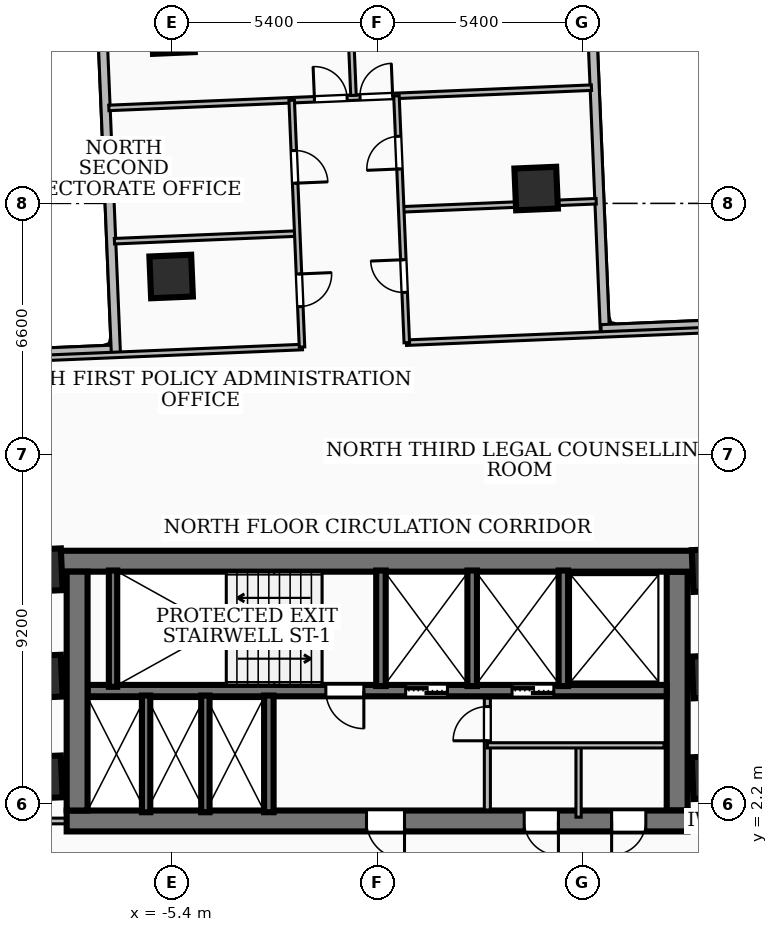
"""IFC4 building model, lengths in metres.
Left out: names, types, materials, properties, quantities, classifications, styles, units other than length and angle.
Written with IfcOpenShell. Run it as: python <this file> out.ifc"""

import sys

from ifc_helpers import new_model, si_unit, direction, frame, frame_2d, origin, origin_2d, place, context, subcontext, project, spatial, rectangle, extrude, element, fill, save


model = new_model("IFC4")
c1 = context("Model", 3, precision=1e-05, world=origin(), true_north=direction((0.0, 1.0)))
c2 = subcontext(c1, "Body", "Model", "MODEL_VIEW")
j1 = project(units=[si_unit("LENGTHUNIT", "METRE"), si_unit("PLANEANGLEUNIT", "RADIAN")], contexts=[c1])
p1 = place(None, origin())
s1 = spatial("IfcSite", under=j1, at=p1, CompositionType="ELEMENT")
p2 = place(p1, origin())
s2 = spatial("IfcBuilding", under=s1, at=p2, CompositionType="ELEMENT")
p3 = place(p2, frame((0.0, 0.0, 42.48)))
s3 = spatial("IfcBuildingStorey", under=s2, at=p3, CompositionType="ELEMENT", Elevation=42.48)
p4 = place(p3, frame((-8.78, 8.585, 0.0), z_axis=(0.0, 0.0, 1.0), x_axis=(1.0, 0.0, 0.0)))
e1 = element("IfcWall", 1, at=p4, inside=s3, PredefinedType="SHEAR", context=c2, shape_type="SweptSolid", body=[
    extrude(rectangle(XDim=17.56, YDim=0.55, at=frame_2d((8.78, 0.0))), origin(), (0.0, 0.0, 1.0), 3.34),
])
p5 = place(p3, frame((8.17, 1.75, 0.0), z_axis=(0.0, 0.0, 1.0), x_axis=(-1.0, 0.0, 0.0)))
e2 = element("IfcWall", 2, at=p5, inside=s3, PredefinedType="SHEAR", context=c2, shape_type="SweptSolid", body=[
    extrude(rectangle(XDim=16.34, YDim=0.55, at=frame_2d((8.17, 0.0))), origin(), (0.0, 0.0, 1.0), 3.34),
])
p6 = place(p5, frame((7.45, 0.0, 0.0)))
e3 = element("IfcOpeningElement", 3, at=p6, cuts=e2, PredefinedType="OPENING", context=c2, shape_type="SweptSolid", body=[
    extrude(rectangle(XDim=1.0, YDim=2.1, at=frame_2d((0.5, 1.05))), frame((0.0, 0.285, 0.0), z_axis=(0.0, -1.0, 0.0), x_axis=(1.0, 0.0, 0.0)), (0.0, 0.0, 1.0), 0.57),
])
p7 = place(p5, frame((3.4, 0.0, 0.0)))
e4 = element("IfcOpeningElement", 4, at=p7, cuts=e2, PredefinedType="OPENING", context=c2, shape_type="SweptSolid", body=[
    extrude(rectangle(XDim=0.9, YDim=2.06, at=frame_2d((0.45, 1.03))), frame((0.0, 0.285, 0.0), z_axis=(0.0, -1.0, 0.0), x_axis=(1.0, 0.0, 0.0)), (0.0, 0.0, 1.0), 0.57),
])
p8 = place(p5, frame((1.1, 0.0, 0.0)))
e5 = element("IfcOpeningElement", 5, at=p8, cuts=e2, PredefinedType="OPENING", context=c2, shape_type="SweptSolid", body=[
    extrude(rectangle(XDim=0.9, YDim=2.06, at=frame_2d((0.45, 1.03))), frame((0.0, 0.285, 0.0), z_axis=(0.0, -1.0, 0.0), x_axis=(1.0, 0.0, 0.0)), (0.0, 0.0, 1.0), 0.57),
])
for number, where, z_axis, x_axis in (
    (6, (-7.895, 2.025, 0.0), (0.0, 0.0, 1.0), (0.0, 1.0, 0.0)),
    (7, (7.895, 8.31, 0.0), (0.0, 0.0, 1.0), (0.0, -1.0, 0.0)),
):
    element("IfcWall", number, at=place(p3, frame(where, z_axis=z_axis, x_axis=x_axis)), inside=s3, PredefinedType="SHEAR", context=c2, shape_type="SweptSolid", body=[
        extrude(rectangle(XDim=6.285, YDim=0.55, at=frame_2d((3.143, 0.0))), origin(), (0.0, 0.0, 1.0), 3.34),
    ])
p9 = place(p3, frame((7.62, 5.18, 0.0), z_axis=(0.0, 0.0, 1.0), x_axis=(-1.0, 0.0, 0.0)))
e8 = element("IfcWall", 8, at=p9, inside=s3, PredefinedType="SOLIDWALL", context=c2, shape_type="SweptSolid", body=[
    extrude(rectangle(XDim=15.24, YDim=0.3, at=frame_2d((7.62, 0.0))), origin(), (0.0, 0.0, 1.0), 3.34),
])
p10 = place(p9, frame((5.77, 0.0, 0.0)))
e9 = element("IfcOpeningElement", 9, at=p10, cuts=e8, PredefinedType="OPENING", context=c2, shape_type="SweptSolid", body=[
    extrude(rectangle(XDim=1.1, YDim=2.15, at=frame_2d((0.55, 1.075))), frame((0.0, 0.16, 0.0), z_axis=(0.0, -1.0, 0.0), x_axis=(1.0, 0.0, 0.0)), (0.0, 0.0, 1.0), 0.32),
])
p11 = place(p9, frame((2.97, 0.0, 0.0)))
e10 = element("IfcOpeningElement", 10, at=p11, cuts=e8, PredefinedType="OPENING", context=c2, shape_type="SweptSolid", body=[
    extrude(rectangle(XDim=1.1, YDim=2.15, at=frame_2d((0.55, 1.075))), frame((0.0, 0.16, 0.0), z_axis=(0.0, -1.0, 0.0), x_axis=(1.0, 0.0, 0.0)), (0.0, 0.0, 1.0), 0.32),
])
p12 = place(p9, frame((7.97, 0.0, 0.0)))
e11 = element("IfcOpeningElement", 11, at=p12, cuts=e8, PredefinedType="OPENING", context=c2, shape_type="SweptSolid", body=[
    extrude(rectangle(XDim=1.0, YDim=2.1, at=frame_2d((0.5, 1.05))), frame((0.0, 0.16, 0.0), z_axis=(0.0, -1.0, 0.0), x_axis=(1.0, 0.0, 0.0)), (0.0, 0.0, 1.0), 0.32),
])
p13 = place(p3, frame((-6.95, 5.28, 0.0), z_axis=(0.0, 0.0, 1.0), x_axis=(0.0, 1.0, 0.0)))
e12 = element("IfcWall", 12, at=p13, inside=s3, PredefinedType="SOLIDWALL", context=c2, shape_type="SweptSolid", body=[
    extrude(rectangle(XDim=3.06, YDim=0.22, at=frame_2d((1.53, 0.0))), origin(), (0.0, 0.0, 1.0), 3.34),
])
for number, where, z_axis, x_axis in (
    (13, (0.1, 5.3, 0.0), (0.0, 0.0, 1.0), (0.0, 1.0, 0.0)),
    (14, (2.5, 5.3, 0.0), (0.0, 0.0, 1.0), (0.0, 1.0, 0.0)),
    (15, (4.9, 5.3, 0.0), (0.0, 0.0, 1.0), (0.0, 1.0, 0.0)),
):
    element("IfcWall", number, at=place(p3, frame(where, z_axis=z_axis, x_axis=x_axis)), inside=s3, PredefinedType="SOLIDWALL", context=c2, shape_type="SweptSolid", body=[
        extrude(rectangle(XDim=3.04, YDim=0.25, at=frame_2d((1.52, 0.0))), origin(), (0.0, 0.0, 1.0), 3.34),
    ])
p14 = place(p3, frame((-2.85, 1.98, 0.0), z_axis=(0.0, 0.0, 1.0), x_axis=(0.0, 1.0, 0.0)))
e16 = element("IfcWall", 16, at=p14, inside=s3, PredefinedType="SOLIDWALL", context=c2, shape_type="SweptSolid", body=[
    extrude(rectangle(XDim=3.07, YDim=0.25, at=frame_2d((1.535, 0.0))), origin(), (0.0, 0.0, 1.0), 3.34),
])
for number, where, z_axis, x_axis in (
    (17, (-6.08, 1.98, 0.0), (0.0, 0.0, 1.0), (0.0, 1.0, 0.0)),
    (18, (-4.52, 1.98, 0.0), (0.0, 0.0, 1.0), (0.0, 1.0, 0.0)),
):
    element("IfcWall", number, at=place(p3, frame(where, z_axis=z_axis, x_axis=x_axis)), inside=s3, PredefinedType="SOLIDWALL", context=c2, shape_type="SweptSolid", body=[
        extrude(rectangle(XDim=3.07, YDim=0.22, at=frame_2d((1.535, 0.0))), origin(), (0.0, 0.0, 1.0), 3.34),
    ])
for number, where, z_axis, x_axis in (
    (19, (-8.85, 2.9, 0.0), (0.0, 0.0, 1.0), (0.999, 0.042, 0.0)),
    (20, (-8.85, 5.55, 0.0), (0.0, 0.0, 1.0), (0.999, 0.042, 0.0)),
    (21, (8.85, 2.9, 0.0), (0.0, 0.0, 1.0), (0.999, 0.042, 0.0)),
    (22, (8.85, 5.55, 0.0), (0.0, 0.0, 1.0), (0.999, 0.042, 0.0)),
    (23, (-8.85, 8.35, 0.0), (0.0, 0.0, 1.0), (0.999, 0.042, 0.0)),
    (24, (8.85, 8.35, 0.0), (0.0, 0.0, 1.0), (0.999, 0.042, 0.0)),
    (25, (4.184, 18.391, 0.0), (0.0, 0.0, 1.0), (0.999, 0.042, 0.0)),
    (26, (-5.421, 16.076, 0.0), (0.0, 0.0, 1.0), (0.999, 0.042, 0.0)),
    (27, (-5.372, 22.507, 0.0), (0.0, 0.0, 1.0), (0.999, 0.042, 0.0)),
):
    element("IfcColumn", number, at=place(p3, frame(where, z_axis=z_axis, x_axis=x_axis)), inside=s3, PredefinedType="COLUMN", context=c2, shape_type="SweptSolid", body=[
        extrude(rectangle(XDim=1.1, YDim=1.1, at=origin_2d()), origin(), (0.0, 0.0, 1.0), 3.6),
    ])
p15 = place(p3, frame((-13.552, 13.875, 0.0), z_axis=(0.0, 0.0, 1.0), x_axis=(0.999127443157, 0.041765444226, 0.0)))
e28 = element("IfcWall", 28, at=p15, inside=s3, PredefinedType="SOLIDWALL", context=c2, shape_type="SweptSolid", body=[
    extrude(rectangle(XDim=6.775, YDim=0.24, at=frame_2d((3.387, 0.0))), origin(), (0.0, 0.0, 1.0), 3.34),
])
p16 = place(p3, frame((-6.875, 14.058, 0.0), z_axis=(0.0, 0.0, 1.0), x_axis=(-0.041850586852, 0.999123880397, 0.0)))
e29 = element("IfcWall", 29, at=p16, inside=s3, PredefinedType="SOLIDWALL", context=c2, shape_type="SweptSolid", body=[
    extrude(rectangle(XDim=13.476, YDim=0.24, at=frame_2d((6.738, 0.0))), origin(), (0.0, 0.0, 1.0), 3.34),
])
p17 = place(p16, frame((9.976, 0.0, 0.85)))
e30 = element("IfcOpeningElement", 30, at=p17, cuts=e29, PredefinedType="OPENING", context=c2, shape_type="SweptSolid", body=[
    extrude(rectangle(XDim=2.4, YDim=2.1, at=frame_2d((1.2, 1.05))), frame((0.0, 0.13, 0.0), z_axis=(0.0, -1.0, 0.0), x_axis=(1.0, 0.0, 0.0)), (0.0, 0.0, 1.0), 0.26),
])
p18 = place(p3, frame((5.43, 28.061, 0.0), z_axis=(0.0, 0.0, 1.0), x_axis=(0.041852859621, -0.999123785195, 0.0)))
e31 = element("IfcWall", 31, at=p18, inside=s3, PredefinedType="SOLIDWALL", context=c2, shape_type="SweptSolid", body=[
    extrude(rectangle(XDim=13.475, YDim=0.24, at=frame_2d((6.737, 0.0))), origin(), (0.0, 0.0, 1.0), 2.421),
])
p19 = place(p3, frame((5.894, 14.69, 0.0), z_axis=(0.0, 0.0, 1.0), x_axis=(0.999124860845, 0.041827173477, 0.0)))
e32 = element("IfcWall", 32, at=p19, inside=s3, PredefinedType="SOLIDWALL", context=c2, shape_type="SweptSolid", body=[
    extrude(rectangle(XDim=6.456, YDim=0.24, at=frame_2d((3.228, 0.0))), origin(), (0.0, 0.0, 1.0), 2.421),
])
p20 = place(p3, frame((2.9, 2.04, 0.0), z_axis=(0.0, 0.0, 1.0), x_axis=(0.0, 1.0, 0.0)))
e33 = element("IfcWall", 33, at=p20, inside=s3, PredefinedType="PARTITIONING", context=c2, shape_type="SweptSolid", body=[
    extrude(rectangle(XDim=2.94, YDim=0.16, at=frame_2d((1.47, 0.0))), origin(), (0.0, 0.0, 1.0), 2.405),
])
p21 = place(p20, frame((1.82, 0.0, 0.0)))
e34 = element("IfcOpeningElement", 34, at=p21, cuts=e33, PredefinedType="OPENING", context=c2, shape_type="SweptSolid", body=[
    extrude(rectangle(XDim=0.9, YDim=2.06, at=frame_2d((0.45, 1.03))), frame((0.0, 0.09, 0.0), z_axis=(0.0, -1.0, 0.0), x_axis=(1.0, 0.0, 0.0)), (0.0, 0.0, 1.0), 0.18),
])
p22 = place(p3, frame((2.9, 3.74, 0.0), z_axis=(0.0, 0.0, 1.0), x_axis=(1.0, 0.0, 0.0)))
e35 = element("IfcWall", 35, at=p22, inside=s3, PredefinedType="PARTITIONING", context=c2, shape_type="SweptSolid", body=[
    extrude(rectangle(XDim=4.65, YDim=0.138, at=frame_2d((2.325, 0.0))), origin(), (0.0, 0.0, 1.0), 3.34),
])
p23 = place(p3, frame((5.3, 1.85, 0.0), z_axis=(0.0, 0.0, 1.0), x_axis=(0.0, 1.0, 0.0)))
e36 = element("IfcWall", 36, at=p23, inside=s3, PredefinedType="PARTITIONING", context=c2, shape_type="SweptSolid", body=[
    extrude(rectangle(XDim=1.89, YDim=0.138, at=frame_2d((0.945, 0.0))), origin(), (0.0, 0.0, 1.0), 2.405),
])
for number, where, z_axis, x_axis in (
    (37, (-7.85, 1.75, 0.0), (0.0, 0.0, 1.0), (-1.0, 0.0, 0.0)),
    (38, (7.85, 1.75, 0.0), (0.0, 0.0, 1.0), (1.0, 0.0, 0.0)),
):
    element("IfcWall", number, at=place(p3, frame(where, z_axis=z_axis, x_axis=x_axis)), inside=s3, PredefinedType="PARTITIONING", context=c2, shape_type="SweptSolid", body=[
        extrude(rectangle(XDim=1.67, YDim=0.15, at=frame_2d((0.835, 0.0))), origin(), (0.0, 0.0, 1.0), 2.405),
    ])
p24 = place(p3, frame((-1.967, 14.22, 0.0), z_axis=(0.0, 0.0, 1.0), x_axis=(-0.99911977153, -0.041948565382, 0.0)))
e39 = element("IfcWall", 39, at=p24, inside=s3, PredefinedType="PARTITIONING", context=c2, shape_type="SweptSolid", body=[
    extrude(rectangle(XDim=8.27, YDim=0.145, at=frame_2d((4.135, 0.0))), origin(), (0.0, 0.0, 1.0), 2.421),
])
p25 = place(p3, frame((8.714, 14.668, 0.0), z_axis=(0.0, 0.0, 1.0), x_axis=(-0.999122557945, -0.041882146625, 0.0)))
e40 = element("IfcWall", 40, at=p25, inside=s3, PredefinedType="PARTITIONING", context=c2, shape_type="SweptSolid", body=[
    extrude(rectangle(XDim=7.951, YDim=0.145, at=frame_2d((3.976, 0.0))), origin(), (0.0, 0.0, 1.0), 2.421),
])
p26 = place(p3, frame((-2.122, 17.206, 0.0), z_axis=(0.0, 0.0, 1.0), x_axis=(-0.999119609111, -0.041952433648, 0.0)))
e41 = element("IfcWall", 41, at=p26, inside=s3, PredefinedType="PARTITIONING", context=c2, shape_type="SweptSolid", body=[
    extrude(rectangle(XDim=4.795, YDim=0.145, at=frame_2d((2.397, 0.0))), origin(), (0.0, 0.0, 1.0), 2.421),
])
p27 = place(p3, frame((5.764, 18.057, 0.0), z_axis=(0.0, 0.0, 1.0), x_axis=(-0.999125612634, -0.041809211649, 0.0)))
e42 = element("IfcWall", 42, at=p27, inside=s3, PredefinedType="PARTITIONING", context=c2, shape_type="SweptSolid", body=[
    extrude(rectangle(XDim=5.115, YDim=0.145, at=frame_2d((2.558, 0.0))), origin(), (0.0, 0.0, 1.0), 2.421),
])
p28 = place(p3, frame((-2.249, 20.714, 0.0), z_axis=(0.0, 0.0, 1.0), x_axis=(0.041843020894, -0.999124197286, 0.0)))
e43 = element("IfcWall", 43, at=p28, inside=s3, PredefinedType="PARTITIONING", context=c2, shape_type="SweptSolid", body=[
    extrude(rectangle(XDim=6.5, YDim=0.145, at=frame_2d((3.25, 0.0))), origin(), (0.0, 0.0, 1.0), 3.34),
])
p29 = place(p28, frame((4.575, 0.0, 0.0)))
e44 = element("IfcOpeningElement", 44, at=p29, cuts=e43, PredefinedType="OPENING", context=c2, shape_type="SweptSolid", body=[
    extrude(rectangle(XDim=0.86, YDim=2.04, at=frame_2d((0.43, 1.02))), frame((0.0, 0.083, 0.0), z_axis=(0.0, -1.0, 0.0), x_axis=(1.0, 0.0, 0.0)), (0.0, 0.0, 1.0), 0.165),
])
p30 = place(p28, frame((1.325, 0.0, 0.0)))
e45 = element("IfcOpeningElement", 45, at=p30, cuts=e43, PredefinedType="OPENING", context=c2, shape_type="SweptSolid", body=[
    extrude(rectangle(XDim=0.86, YDim=2.04, at=frame_2d((0.43, 1.02))), frame((0.0, 0.083, 0.0), z_axis=(0.0, -1.0, 0.0), x_axis=(1.0, 0.0, 0.0)), (0.0, 0.0, 1.0), 0.165),
])
p31 = place(p3, frame((0.78, 14.335, 0.0), z_axis=(0.0, 0.0, 1.0), x_axis=(-0.041836740669, 0.99912446028, 0.0)))
e46 = element("IfcWall", 46, at=p31, inside=s3, PredefinedType="PARTITIONING", context=c2, shape_type="SweptSolid", body=[
    extrude(rectangle(XDim=6.501, YDim=0.145, at=frame_2d((3.25, 0.0))), origin(), (0.0, 0.0, 1.0), 3.34),
])
p32 = place(p31, frame((1.325, 0.0, 0.0)))
e47 = element("IfcOpeningElement", 47, at=p32, cuts=e46, PredefinedType="OPENING", context=c2, shape_type="SweptSolid", body=[
    extrude(rectangle(XDim=0.86, YDim=2.04, at=frame_2d((0.43, 1.02))), frame((0.0, 0.083, 0.0), z_axis=(0.0, -1.0, 0.0), x_axis=(1.0, 0.0, 0.0)), (0.0, 0.0, 1.0), 0.165),
])
p33 = place(p31, frame((4.575, 0.0, 0.0)))
e48 = element("IfcOpeningElement", 48, at=p33, cuts=e46, PredefinedType="OPENING", context=c2, shape_type="SweptSolid", body=[
    extrude(rectangle(XDim=0.86, YDim=2.04, at=frame_2d((0.43, 1.02))), frame((0.0, 0.083, 0.0), z_axis=(0.0, -1.0, 0.0), x_axis=(1.0, 0.0, 0.0)), (0.0, 0.0, 1.0), 0.165),
])
p34 = place(p3, frame((-0.623, 20.842, 0.0), z_axis=(0.0, 0.0, 1.0), x_axis=(-0.041805771438, 0.999125756586, 0.0)))
e49 = element("IfcWall", 49, at=p34, inside=s3, PredefinedType="PARTITIONING", context=c2, shape_type="SweptSolid", body=[
    extrude(rectangle(XDim=8.345, YDim=0.145, at=frame_2d((4.173, 0.0))), origin(), (0.0, 0.0, 1.0), 2.832),
])
p35 = place(p3, frame((-7.06, 20.512, 0.0), z_axis=(0.0, 0.0, 1.0), x_axis=(0.99912047737, 0.041931750497, 0.0)))
e50 = element("IfcWall", 50, at=p35, inside=s3, PredefinedType="PARTITIONING", context=c2, shape_type="SweptSolid", body=[
    extrude(rectangle(XDim=12.71, YDim=0.145, at=frame_2d((6.355, 0.0))), origin(), (0.0, 0.0, 1.0), 2.421),
])
p36 = place(p35, frame((6.615, 0.0, 0.0)))
e51 = element("IfcOpeningElement", 51, at=p36, cuts=e50, PredefinedType="OPENING", context=c2, shape_type="SweptSolid", body=[
    extrude(rectangle(XDim=0.86, YDim=2.04, at=frame_2d((0.43, 1.02))), frame((0.0, 0.083, 0.0), z_axis=(0.0, -1.0, 0.0), x_axis=(1.0, 0.0, 0.0)), (0.0, 0.0, 1.0), 0.165),
])
p37 = place(p35, frame((5.415, 0.0, 0.0)))
e52 = element("IfcOpeningElement", 52, at=p37, cuts=e50, PredefinedType="OPENING", context=c2, shape_type="SweptSolid", body=[
    extrude(rectangle(XDim=0.86, YDim=2.04, at=frame_2d((0.43, 1.02))), frame((0.0, 0.083, 0.0), z_axis=(0.0, -1.0, 0.0), x_axis=(1.0, 0.0, 0.0)), (0.0, 0.0, 1.0), 0.165),
])
p38 = place(p6, origin())
e53 = element("IfcDoor", 53, at=p38, inside=s3, OperationType="SINGLE_SWING_LEFT", PredefinedType="DOOR", context=c2, shape_type="SweptSolid", body=[
    extrude(rectangle(XDim=1.0, YDim=2.1, at=frame_2d((0.5, 1.05))), frame((0.0, 0.025, 0.0), z_axis=(0.0, -1.0, 0.0), x_axis=(1.0, 0.0, 0.0)), (0.0, 0.0, 1.0), 0.05),
])
fill(e3, e53)
p39 = place(p10, origin())
e54 = element("IfcDoor", 54, at=p39, inside=s3, OperationType="DOUBLE_DOOR_SLIDING", PredefinedType="DOOR", context=c2, shape_type="SweptSolid", body=[
    extrude(rectangle(XDim=1.1, YDim=2.15, at=frame_2d((0.55, 1.075))), frame((0.0, 0.025, 0.0), z_axis=(0.0, -1.0, 0.0), x_axis=(1.0, 0.0, 0.0)), (0.0, 0.0, 1.0), 0.05),
])
fill(e9, e54)
p40 = place(p11, origin())
e55 = element("IfcDoor", 55, at=p40, inside=s3, OperationType="DOUBLE_DOOR_SLIDING", PredefinedType="DOOR", context=c2, shape_type="SweptSolid", body=[
    extrude(rectangle(XDim=1.1, YDim=2.15, at=frame_2d((0.55, 1.075))), frame((0.0, 0.025, 0.0), z_axis=(0.0, -1.0, 0.0), x_axis=(1.0, 0.0, 0.0)), (0.0, 0.0, 1.0), 0.05),
])
fill(e10, e55)
p41 = place(p12, origin())
e56 = element("IfcDoor", 56, at=p41, inside=s3, OperationType="SINGLE_SWING_LEFT", PredefinedType="DOOR", context=c2, shape_type="SweptSolid", body=[
    extrude(rectangle(XDim=1.0, YDim=2.1, at=frame_2d((0.5, 1.05))), frame((0.0, 0.025, 0.0), z_axis=(0.0, -1.0, 0.0), x_axis=(1.0, 0.0, 0.0)), (0.0, 0.0, 1.0), 0.05),
])
fill(e11, e56)
p42 = place(p7, origin())
e57 = element("IfcDoor", 57, at=p42, inside=s3, OperationType="SINGLE_SWING_LEFT", PredefinedType="DOOR", context=c2, shape_type="SweptSolid", body=[
    extrude(rectangle(XDim=0.9, YDim=2.06, at=frame_2d((0.45, 1.03))), frame((0.0, 0.025, 0.0), z_axis=(0.0, -1.0, 0.0), x_axis=(1.0, 0.0, 0.0)), (0.0, 0.0, 1.0), 0.05),
])
fill(e4, e57)
p43 = place(p8, origin())
e58 = element("IfcDoor", 58, at=p43, inside=s3, OperationType="SINGLE_SWING_RIGHT", PredefinedType="DOOR", context=c2, shape_type="SweptSolid", body=[
    extrude(rectangle(XDim=0.9, YDim=2.06, at=frame_2d((0.45, 1.03))), frame((0.0, 0.025, 0.0), z_axis=(0.0, -1.0, 0.0), x_axis=(1.0, 0.0, 0.0)), (0.0, 0.0, 1.0), 0.05),
])
fill(e5, e58)
p44 = place(p21, origin())
e59 = element("IfcDoor", 59, at=p44, inside=s3, OperationType="SINGLE_SWING_LEFT", PredefinedType="DOOR", context=c2, shape_type="SweptSolid", body=[
    extrude(rectangle(XDim=0.9, YDim=2.06, at=frame_2d((0.45, 1.03))), frame((0.0, 0.025, 0.0), z_axis=(0.0, -1.0, 0.0), x_axis=(1.0, 0.0, 0.0)), (0.0, 0.0, 1.0), 0.05),
])
fill(e34, e59)
p45 = place(p29, origin())
e60 = element("IfcDoor", 60, at=p45, inside=s3, OperationType="SINGLE_SWING_LEFT", PredefinedType="DOOR", context=c2, shape_type="SweptSolid", body=[
    extrude(rectangle(XDim=0.86, YDim=2.04, at=frame_2d((0.43, 1.02))), frame((0.0, 0.025, 0.0), z_axis=(0.0, -1.0, 0.0), x_axis=(1.0, 0.0, 0.0)), (0.0, 0.0, 1.0), 0.05),
])
fill(e44, e60)
p46 = place(p30, origin())
e61 = element("IfcDoor", 61, at=p46, inside=s3, OperationType="SINGLE_SWING_RIGHT", PredefinedType="DOOR", context=c2, shape_type="SweptSolid", body=[
    extrude(rectangle(XDim=0.86, YDim=2.04, at=frame_2d((0.43, 1.02))), frame((0.0, 0.025, 0.0), z_axis=(0.0, -1.0, 0.0), x_axis=(1.0, 0.0, 0.0)), (0.0, 0.0, 1.0), 0.05),
])
fill(e45, e61)
p47 = place(p32, origin())
e62 = element("IfcDoor", 62, at=p47, inside=s3, OperationType="SINGLE_SWING_RIGHT", PredefinedType="DOOR", context=c2, shape_type="SweptSolid", body=[
    extrude(rectangle(XDim=0.86, YDim=2.04, at=frame_2d((0.43, 1.02))), frame((0.0, 0.025, 0.0), z_axis=(0.0, -1.0, 0.0), x_axis=(1.0, 0.0, 0.0)), (0.0, 0.0, 1.0), 0.05),
])
fill(e47, e62)
p48 = place(p33, origin())
e63 = element("IfcDoor", 63, at=p48, inside=s3, OperationType="SINGLE_SWING_LEFT", PredefinedType="DOOR", context=c2, shape_type="SweptSolid", body=[
    extrude(rectangle(XDim=0.86, YDim=2.04, at=frame_2d((0.43, 1.02))), frame((0.0, 0.025, 0.0), z_axis=(0.0, -1.0, 0.0), x_axis=(1.0, 0.0, 0.0)), (0.0, 0.0, 1.0), 0.05),
])
fill(e48, e63)
p49 = place(p36, origin())
e64 = element("IfcDoor", 64, at=p49, inside=s3, OperationType="SINGLE_SWING_RIGHT", PredefinedType="DOOR", context=c2, shape_type="SweptSolid", body=[
    extrude(rectangle(XDim=0.86, YDim=2.04, at=frame_2d((0.43, 1.02))), frame((0.0, 0.025, 0.0), z_axis=(0.0, -1.0, 0.0), x_axis=(1.0, 0.0, 0.0)), (0.0, 0.0, 1.0), 0.05),
])
fill(e51, e64)
p50 = place(p37, origin())
e65 = element("IfcDoor", 65, at=p50, inside=s3, OperationType="SINGLE_SWING_LEFT", PredefinedType="DOOR", context=c2, shape_type="SweptSolid", body=[
    extrude(rectangle(XDim=0.86, YDim=2.04, at=frame_2d((0.43, 1.02))), frame((0.0, 0.025, 0.0), z_axis=(0.0, -1.0, 0.0), x_axis=(1.0, 0.0, 0.0)), (0.0, 0.0, 1.0), 0.05),
])
fill(e52, e65)
save(model, sys.argv[1])
